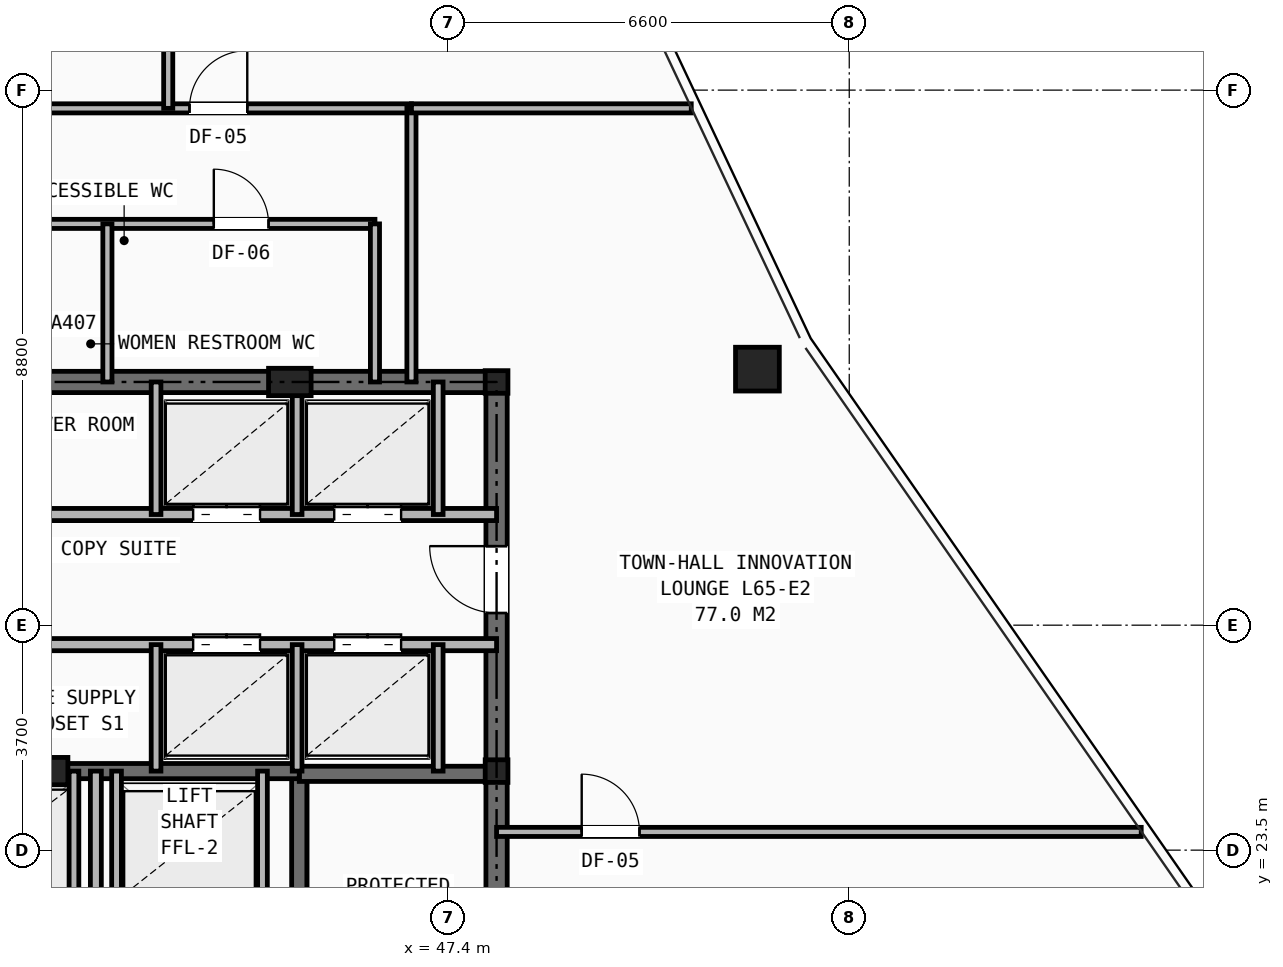
"""IFC4 building model, lengths in metres.
Left out: names, types, materials, properties, quantities, classifications, styles, units other than length and angle.
Written with IfcOpenShell. Run it as: python <this file> out.ifc"""

import sys

from ifc_helpers import new_model, si_unit, direction, frame, frame_2d, origin, origin_2d, place, context, subcontext, project, spatial, rectangle, hollow_rectangle, i_section, extrude, element, fill, save


model = new_model("IFC4")
c1 = context("Model", 3, precision=1e-05, world=origin(), true_north=direction((0.0, 1.0)))
c2 = subcontext(c1, "Body", "Model", "MODEL_VIEW")
j1 = project(units=[si_unit("LENGTHUNIT", "METRE"), si_unit("PLANEANGLEUNIT", "RADIAN")], contexts=[c1])
p1 = place(None, origin())
s1 = spatial("IfcSite", under=j1, at=p1, CompositionType="ELEMENT")
p2 = place(p1, origin())
s2 = spatial("IfcBuilding", under=s1, at=p2, CompositionType="ELEMENT")
p3 = place(p2, frame((0.0, 0.0, 229.4)))
s3 = spatial("IfcBuildingStorey", under=s2, at=p3, CompositionType="ELEMENT", Elevation=229.4)
for number, where, z_axis, x_axis in (
    (1, (48.2, 24.8, 0.0), (0.0, 0.0, 1.0), (1.0, 0.0, 0.0)),
    (2, (48.2, 31.2, 0.0), (0.0, 0.0, 1.0), (1.0, 0.0, 0.0)),
):
    element("IfcColumn", number, at=place(p3, frame(where, z_axis=z_axis, x_axis=x_axis)), inside=s3, PredefinedType="COLUMN", context=c2, shape_type="SweptSolid", body=[
        extrude(i_section(OverallWidth=0.374, OverallDepth=0.372, WebThickness=0.016, FlangeThickness=0.026, at=origin_2d()), origin(), (0.0, 0.0, 1.0), 3.5),
    ])
for number, where, z_axis, x_axis in (
    (3, (44.8, 31.2, 0.0), (0.0, 0.0, 1.0), (1.0, 0.0, 0.0)),
    (4, (40.8, 24.8, 0.0), (0.0, 0.0, 1.0), (1.0, 0.0, 0.0)),
):
    element("IfcColumn", number, at=place(p3, frame(where, z_axis=z_axis, x_axis=x_axis)), inside=s3, PredefinedType="PILASTER", context=c2, shape_type="SweptSolid", body=[
        extrude(rectangle(XDim=0.7, YDim=0.45, at=origin_2d()), origin(), (0.0, 0.0, 1.0), 3.5),
    ])
p4 = place(p3, frame((52.49, 31.411, 0.0), z_axis=(0.0, 0.0, 1.0), x_axis=(1.0, 0.0, 0.0)))
e5 = element("IfcColumn", 5, at=p4, inside=s3, PredefinedType="COLUMN", context=c2, shape_type="SweptSolid", body=[
    extrude(hollow_rectangle(XDim=0.72, YDim=0.72, WallThickness=0.05, at=origin_2d()), origin(), (0.0, 0.0, 1.0), 3.5),
])
p5 = place(p3, frame((31.8, 31.2, 0.0), z_axis=(0.0, 0.0, 1.0), x_axis=(1.0, 0.0, 0.0)))
e6 = element("IfcWall", 6, at=p5, inside=s3, PredefinedType="SHEAR", context=c2, shape_type="SweptSolid", body=[
    extrude(rectangle(XDim=16.4, YDim=0.35, at=frame_2d((8.2, 0.0))), origin(), (0.0, 0.0, 1.0), 3.25),
])
p6 = place(p3, frame((48.2, 16.4, 0.0), z_axis=(0.0, 0.0, 1.0), x_axis=(0.0, 1.0, 0.0)))
e7 = element("IfcWall", 7, at=p6, inside=s3, PredefinedType="SHEAR", context=c2, shape_type="SweptSolid", body=[
    extrude(rectangle(XDim=14.8, YDim=0.35, at=frame_2d((7.4, 0.0))), origin(), (0.0, 0.0, 1.0), 3.25),
])
p7 = place(p6, frame((11.0, 0.0, 0.0)))
e8 = element("IfcOpeningElement", 8, at=p7, cuts=e7, PredefinedType="OPENING", context=c2, shape_type="SweptSolid", body=[
    extrude(rectangle(XDim=1.1, YDim=2.15, at=frame_2d((0.55, 1.075))), frame((0.0, 0.185, 0.0), z_axis=(0.0, -1.0, 0.0), x_axis=(1.0, 0.0, 0.0)), (0.0, 0.0, 1.0), 0.37),
])
p8 = place(p3, frame((44.955, 16.4, 0.0), z_axis=(0.0, 0.0, 1.0), x_axis=(0.0, 1.0, 0.0)))
e9 = element("IfcWall", 9, at=p8, inside=s3, PredefinedType="SHEAR", context=c2, shape_type="SweptSolid", body=[
    extrude(rectangle(XDim=8.4, YDim=0.25, at=frame_2d((4.2, 0.0))), origin(), (0.0, 0.0, 1.0), 3.25),
])
p9 = place(p8, frame((0.45, 0.0, 0.0)))
e10 = element("IfcOpeningElement", 10, at=p9, cuts=e9, PredefinedType="OPENING", context=c2, shape_type="SweptSolid", body=[
    extrude(rectangle(XDim=0.95, YDim=2.1, at=frame_2d((0.475, 1.05))), frame((0.0, 0.135, 0.0), z_axis=(0.0, -1.0, 0.0), x_axis=(1.0, 0.0, 0.0)), (0.0, 0.0, 1.0), 0.27),
])
p10 = place(p3, frame((44.955, 24.755, 0.0), z_axis=(0.0, 0.0, 1.0), x_axis=(1.0, 0.0, 0.0)))
e11 = element("IfcWall", 11, at=p10, inside=s3, PredefinedType="SHEAR", context=c2, shape_type="SweptSolid", body=[
    extrude(rectangle(XDim=3.245, YDim=0.25, at=frame_2d((1.623, 0.0))), origin(), (0.0, 0.0, 1.0), 3.25),
])
p11 = place(p3, frame((35.045, 24.8, 0.0), z_axis=(0.0, 0.0, 1.0), x_axis=(1.0, 0.0, 0.0)))
e12 = element("IfcWall", 12, at=p11, inside=s3, PredefinedType="SHEAR", context=c2, shape_type="SweptSolid", body=[
    extrude(rectangle(XDim=9.91, YDim=0.25, at=frame_2d((4.955, 0.0))), origin(), (0.0, 0.0, 1.0), 3.25),
])
p12 = place(p3, frame((41.61, 16.4, 0.0), z_axis=(0.0, 0.0, 1.0), x_axis=(0.0, 1.0, 0.0)))
e13 = element("IfcWall", 13, at=p12, inside=s3, PredefinedType="PARTITIONING", context=c2, shape_type="SweptSolid", body=[
    extrude(rectangle(XDim=8.4, YDim=0.18, at=frame_2d((4.2, 0.0))), origin(), (0.0, 0.0, 1.0), 2.978),
])
p13 = place(p12, frame((1.8, 0.0, 0.0)))
e14 = element("IfcOpeningElement", 14, at=p13, cuts=e13, PredefinedType="OPENING", context=c2, shape_type="SweptSolid", body=[
    extrude(rectangle(XDim=0.85, YDim=2.05, at=frame_2d((0.425, 1.025))), frame((0.0, 0.1, 0.0), z_axis=(0.0, -1.0, 0.0), x_axis=(1.0, 0.0, 0.0)), (0.0, 0.0, 1.0), 0.2),
])
for number, where, z_axis, x_axis in (
    (15, (41.95, 22.48, 0.0), (0.0, 0.0, 1.0), (0.0, 1.0, 0.0)),
    (16, (44.35, 22.48, 0.0), (0.0, 0.0, 1.0), (0.0, 1.0, 0.0)),
    (17, (41.25, 22.48, 0.0), (0.0, 0.0, 1.0), (0.0, 1.0, 0.0)),
):
    element("IfcWall", number, at=place(p3, frame(where, z_axis=z_axis, x_axis=x_axis)), inside=s3, PredefinedType="SOLIDWALL", context=c2, shape_type="SweptSolid", body=[
        extrude(rectangle(XDim=2.32, YDim=0.16, at=frame_2d((1.16, 0.0))), origin(), (0.0, 0.0, 1.0), 3.25),
    ])
p14 = place(p3, frame((33.82, 29.02, 0.0), z_axis=(0.0, 0.0, 1.0), x_axis=(1.0, 0.0, 0.0)))
e18 = element("IfcWall", 18, at=p14, inside=s3, PredefinedType="SOLIDWALL", context=c2, shape_type="SweptSolid", body=[
    extrude(rectangle(XDim=14.38, YDim=0.2, at=frame_2d((7.19, 0.0))), origin(), (0.0, 0.0, 1.0), 2.705),
])
p15 = place(p14, frame((3.92, 0.0, 0.0)))
e19 = element("IfcOpeningElement", 19, at=p15, cuts=e18, PredefinedType="OPENING", context=c2, shape_type="SweptSolid", body=[
    extrude(rectangle(XDim=0.9, YDim=2.1, at=frame_2d((0.45, 1.05))), frame((0.0, 0.11, 0.0), z_axis=(0.0, -1.0, 0.0), x_axis=(1.0, 0.0, 0.0)), (0.0, 0.0, 1.0), 0.22),
])
p16 = place(p14, frame((9.39, 0.0, 0.0)))
e20 = element("IfcOpeningElement", 20, at=p16, cuts=e18, PredefinedType="OPENING", context=c2, shape_type="SweptSolid", body=[
    extrude(rectangle(XDim=1.1, YDim=2.15, at=frame_2d((0.55, 1.075))), frame((0.0, 0.11, 0.0), z_axis=(0.0, -1.0, 0.0), x_axis=(1.0, 0.0, 0.0)), (0.0, 0.0, 1.0), 0.22),
])
p17 = place(p14, frame((11.71, 0.0, 0.0)))
e21 = element("IfcOpeningElement", 21, at=p17, cuts=e18, PredefinedType="OPENING", context=c2, shape_type="SweptSolid", body=[
    extrude(rectangle(XDim=1.1, YDim=2.15, at=frame_2d((0.55, 1.075))), frame((0.0, 0.11, 0.0), z_axis=(0.0, -1.0, 0.0), x_axis=(1.0, 0.0, 0.0)), (0.0, 0.0, 1.0), 0.22),
])
p18 = place(p3, frame((33.82, 26.88, 0.0), z_axis=(0.0, 0.0, 1.0), x_axis=(1.0, 0.0, 0.0)))
e22 = element("IfcWall", 22, at=p18, inside=s3, PredefinedType="SOLIDWALL", context=c2, shape_type="SweptSolid", body=[
    extrude(rectangle(XDim=14.38, YDim=0.2, at=frame_2d((7.19, 0.0))), origin(), (0.0, 0.0, 1.0), 2.705),
])
p19 = place(p18, frame((1.78, 0.0, 0.0)))
e23 = element("IfcOpeningElement", 23, at=p19, cuts=e22, PredefinedType="OPENING", context=c2, shape_type="SweptSolid", body=[
    extrude(rectangle(XDim=0.9, YDim=2.1, at=frame_2d((0.45, 1.05))), frame((0.0, 0.11, 0.0), z_axis=(0.0, -1.0, 0.0), x_axis=(1.0, 0.0, 0.0)), (0.0, 0.0, 1.0), 0.22),
])
p20 = place(p18, frame((6.07, 0.0, 0.0)))
e24 = element("IfcOpeningElement", 24, at=p20, cuts=e22, PredefinedType="OPENING", context=c2, shape_type="SweptSolid", body=[
    extrude(rectangle(XDim=0.9, YDim=2.1, at=frame_2d((0.45, 1.05))), frame((0.0, 0.11, 0.0), z_axis=(0.0, -1.0, 0.0), x_axis=(1.0, 0.0, 0.0)), (0.0, 0.0, 1.0), 0.22),
])
p21 = place(p18, frame((9.39, 0.0, 0.0)))
e25 = element("IfcOpeningElement", 25, at=p21, cuts=e22, PredefinedType="OPENING", context=c2, shape_type="SweptSolid", body=[
    extrude(rectangle(XDim=1.1, YDim=2.15, at=frame_2d((0.55, 1.075))), frame((0.0, 0.11, 0.0), z_axis=(0.0, -1.0, 0.0), x_axis=(1.0, 0.0, 0.0)), (0.0, 0.0, 1.0), 0.22),
])
p22 = place(p18, frame((11.71, 0.0, 0.0)))
e26 = element("IfcOpeningElement", 26, at=p22, cuts=e22, PredefinedType="OPENING", context=c2, shape_type="SweptSolid", body=[
    extrude(rectangle(XDim=1.1, YDim=2.15, at=frame_2d((0.55, 1.075))), frame((0.0, 0.11, 0.0), z_axis=(0.0, -1.0, 0.0), x_axis=(1.0, 0.0, 0.0)), (0.0, 0.0, 1.0), 0.22),
])
for number, where, z_axis, x_axis in (
    (27, (42.6, 29.02, 0.0), (0.0, 0.0, 1.0), (0.0, 1.0, 0.0)),
    (28, (44.92, 29.02, 0.0), (0.0, 0.0, 1.0), (0.0, 1.0, 0.0)),
    (29, (47.24, 29.02, 0.0), (0.0, 0.0, 1.0), (0.0, 1.0, 0.0)),
):
    element("IfcWall", number, at=place(p3, frame(where, z_axis=z_axis, x_axis=x_axis)), inside=s3, PredefinedType="SOLIDWALL", context=c2, shape_type="SweptSolid", body=[
        extrude(rectangle(XDim=2.18, YDim=0.16, at=frame_2d((1.09, 0.0))), origin(), (0.0, 0.0, 1.0), 2.978),
    ])
for number, where, z_axis, x_axis in (
    (30, (42.6, 24.8, 0.0), (0.0, 0.0, 1.0), (0.0, 1.0, 0.0)),
    (31, (44.92, 24.8, 0.0), (0.0, 0.0, 1.0), (0.0, 1.0, 0.0)),
    (32, (47.24, 24.8, 0.0), (0.0, 0.0, 1.0), (0.0, 1.0, 0.0)),
):
    element("IfcWall", number, at=place(p3, frame(where, z_axis=z_axis, x_axis=x_axis)), inside=s3, PredefinedType="SOLIDWALL", context=c2, shape_type="SweptSolid", body=[
        extrude(rectangle(XDim=2.08, YDim=0.16, at=frame_2d((1.04, 0.0))), origin(), (0.0, 0.0, 1.0), 3.25),
    ])
p23 = place(p3, frame((33.2, 33.8, 0.0), z_axis=(0.0, 0.0, 1.0), x_axis=(1.0, 0.0, 0.0)))
e33 = element("IfcWall", 33, at=p23, inside=s3, PredefinedType="PARTITIONING", context=c2, shape_type="SweptSolid", body=[
    extrude(rectangle(XDim=13.0, YDim=0.15, at=frame_2d((6.5, 0.0))), origin(), (0.0, 0.0, 1.0), 3.25),
])
p24 = place(p23, frame((1.7, 0.0, 0.0)))
e34 = element("IfcOpeningElement", 34, at=p24, cuts=e33, PredefinedType="OPENING", context=c2, shape_type="SweptSolid", body=[
    extrude(rectangle(XDim=0.9, YDim=2.1, at=frame_2d((0.45, 1.05))), frame((0.0, 0.085, 0.0), z_axis=(0.0, -1.0, 0.0), x_axis=(1.0, 0.0, 0.0)), (0.0, 0.0, 1.0), 0.17),
])
p25 = place(p23, frame((6.0, 0.0, 0.0)))
e35 = element("IfcOpeningElement", 35, at=p25, cuts=e33, PredefinedType="OPENING", context=c2, shape_type="SweptSolid", body=[
    extrude(rectangle(XDim=0.9, YDim=2.1, at=frame_2d((0.45, 1.05))), frame((0.0, 0.085, 0.0), z_axis=(0.0, -1.0, 0.0), x_axis=(1.0, 0.0, 0.0)), (0.0, 0.0, 1.0), 0.17),
])
p26 = place(p23, frame((10.35, 0.0, 0.0)))
e36 = element("IfcOpeningElement", 36, at=p26, cuts=e33, PredefinedType="OPENING", context=c2, shape_type="SweptSolid", body=[
    extrude(rectangle(XDim=0.9, YDim=2.1, at=frame_2d((0.45, 1.05))), frame((0.0, 0.085, 0.0), z_axis=(0.0, -1.0, 0.0), x_axis=(1.0, 0.0, 0.0)), (0.0, 0.0, 1.0), 0.17),
])
for number, where, z_axis, x_axis in (
    (37, (46.2, 31.2, 0.0), (0.0, 0.0, 1.0), (0.0, 1.0, 0.0)),
    (38, (41.8, 31.2, 0.0), (0.0, 0.0, 1.0), (0.0, 1.0, 0.0)),
):
    element("IfcWall", number, at=place(p3, frame(where, z_axis=z_axis, x_axis=x_axis)), inside=s3, PredefinedType="PARTITIONING", context=c2, shape_type="SweptSolid", body=[
        extrude(rectangle(XDim=2.6, YDim=0.15, at=frame_2d((1.3, 0.0))), origin(), (0.0, 0.0, 1.0), 2.978),
    ])
p27 = place(p3, frame((40.75, 35.7, 0.0), z_axis=(0.0, 0.0, 1.0), x_axis=(1.0, 0.0, 0.0)))
e39 = element("IfcWall", 39, at=p27, inside=s3, PredefinedType="PARTITIONING", context=c2, shape_type="SweptSolid", body=[
    extrude(rectangle(XDim=6.05, YDim=0.15, at=frame_2d((3.025, 0.0))), origin(), (0.0, 0.0, 1.0), 3.25),
])
p28 = place(p27, frame((2.4, 0.0, 0.0)))
e40 = element("IfcOpeningElement", 40, at=p28, cuts=e39, PredefinedType="OPENING", context=c2, shape_type="SweptSolid", body=[
    extrude(rectangle(XDim=0.95, YDim=2.1, at=frame_2d((0.475, 1.05))), frame((0.0, 0.085, 0.0), z_axis=(0.0, -1.0, 0.0), x_axis=(1.0, 0.0, 0.0)), (0.0, 0.0, 1.0), 0.17),
])
p29 = place(p3, frame((46.8, 31.2, 0.0), z_axis=(0.0, 0.0, 1.0), x_axis=(0.0, 1.0, 0.0)))
e41 = element("IfcWall", 41, at=p29, inside=s3, PredefinedType="PARTITIONING", context=c2, shape_type="SweptSolid", body=[
    extrude(rectangle(XDim=4.5, YDim=0.15, at=frame_2d((2.25, 0.0))), origin(), (0.0, 0.0, 1.0), 2.978),
])
p30 = place(p3, frame((46.8, 35.7, 0.0), z_axis=(0.0, 0.0, 1.0), x_axis=(1.0, 0.0, 0.0)))
e42 = element("IfcWall", 42, at=p30, inside=s3, PredefinedType="PARTITIONING", context=c2, shape_type="SweptSolid", body=[
    extrude(rectangle(XDim=4.602, YDim=0.15, at=frame_2d((2.301, 0.0))), origin(), (0.0, 0.0, 1.0), 2.628),
])
p31 = place(p3, frame((48.2, 23.8, 0.0), z_axis=(0.0, 0.0, 1.0), x_axis=(1.0, 0.0, 0.0)))
e43 = element("IfcWall", 43, at=p31, inside=s3, PredefinedType="PARTITIONING", context=c2, shape_type="SweptSolid", body=[
    extrude(rectangle(XDim=10.602, YDim=0.15, at=frame_2d((5.301, 0.0))), origin(), (0.0, 0.0, 1.0), 2.628),
])
p32 = place(p31, frame((1.4, 0.0, 0.0)))
e44 = element("IfcOpeningElement", 44, at=p32, cuts=e43, PredefinedType="OPENING", context=c2, shape_type="SweptSolid", body=[
    extrude(rectangle(XDim=0.95, YDim=2.1, at=frame_2d((0.475, 1.05))), frame((0.0, 0.085, 0.0), z_axis=(0.0, -1.0, 0.0), x_axis=(1.0, 0.0, 0.0)), (0.0, 0.0, 1.0), 0.17),
])
p33 = place(p3, frame((42.8, 35.7, 0.0), z_axis=(0.0, 0.0, 1.0), x_axis=(0.0, 1.0, 0.0)))
e45 = element("IfcWall", 45, at=p33, inside=s3, PredefinedType="PARTITIONING", context=c2, shape_type="SweptSolid", body=[
    extrude(rectangle(XDim=17.633, YDim=0.15, at=frame_2d((8.816, 0.0))), origin(), (0.0, 0.0, 1.0), 2.292),
])
p34 = place(p7, origin())
e46 = element("IfcDoor", 46, at=p34, inside=s3, OperationType="SINGLE_SWING_RIGHT", PredefinedType="DOOR", context=c2, shape_type="SweptSolid", body=[
    extrude(rectangle(XDim=1.1, YDim=2.15, at=frame_2d((0.55, 1.075))), frame((0.0, 0.025, 0.0), z_axis=(0.0, -1.0, 0.0), x_axis=(1.0, 0.0, 0.0)), (0.0, 0.0, 1.0), 0.05),
])
fill(e8, e46)
p35 = place(p16, origin())
e47 = element("IfcDoor", 47, at=p35, inside=s3, OperationType="DOUBLE_DOOR_SLIDING", PredefinedType="DOOR", context=c2, shape_type="SweptSolid", body=[
    extrude(rectangle(XDim=1.1, YDim=2.15, at=frame_2d((0.55, 1.075))), frame((0.0, 0.025, 0.0), z_axis=(0.0, -1.0, 0.0), x_axis=(1.0, 0.0, 0.0)), (0.0, 0.0, 1.0), 0.05),
])
fill(e20, e47)
p36 = place(p17, origin())
e48 = element("IfcDoor", 48, at=p36, inside=s3, OperationType="DOUBLE_DOOR_SLIDING", PredefinedType="DOOR", context=c2, shape_type="SweptSolid", body=[
    extrude(rectangle(XDim=1.1, YDim=2.15, at=frame_2d((0.55, 1.075))), frame((0.0, 0.025, 0.0), z_axis=(0.0, -1.0, 0.0), x_axis=(1.0, 0.0, 0.0)), (0.0, 0.0, 1.0), 0.05),
])
fill(e21, e48)
p37 = place(p21, origin())
e49 = element("IfcDoor", 49, at=p37, inside=s3, OperationType="DOUBLE_DOOR_SLIDING", PredefinedType="DOOR", context=c2, shape_type="SweptSolid", body=[
    extrude(rectangle(XDim=1.1, YDim=2.15, at=frame_2d((0.55, 1.075))), frame((0.0, 0.025, 0.0), z_axis=(0.0, -1.0, 0.0), x_axis=(1.0, 0.0, 0.0)), (0.0, 0.0, 1.0), 0.05),
])
fill(e25, e49)
p38 = place(p22, origin())
e50 = element("IfcDoor", 50, at=p38, inside=s3, OperationType="DOUBLE_DOOR_SLIDING", PredefinedType="DOOR", context=c2, shape_type="SweptSolid", body=[
    extrude(rectangle(XDim=1.1, YDim=2.15, at=frame_2d((0.55, 1.075))), frame((0.0, 0.025, 0.0), z_axis=(0.0, -1.0, 0.0), x_axis=(1.0, 0.0, 0.0)), (0.0, 0.0, 1.0), 0.05),
])
fill(e26, e50)
p39 = place(p26, origin())
e51 = element("IfcDoor", 51, at=p39, inside=s3, OperationType="SINGLE_SWING_LEFT", PredefinedType="DOOR", context=c2, shape_type="SweptSolid", body=[
    extrude(rectangle(XDim=0.9, YDim=2.1, at=frame_2d((0.45, 1.05))), frame((0.0, 0.025, 0.0), z_axis=(0.0, -1.0, 0.0), x_axis=(1.0, 0.0, 0.0)), (0.0, 0.0, 1.0), 0.05),
])
fill(e36, e51)
p40 = place(p32, origin())
e52 = element("IfcDoor", 52, at=p40, inside=s3, OperationType="SINGLE_SWING_LEFT", PredefinedType="DOOR", context=c2, shape_type="SweptSolid", body=[
    extrude(rectangle(XDim=0.95, YDim=2.1, at=frame_2d((0.475, 1.05))), frame((0.0, 0.025, 0.0), z_axis=(0.0, -1.0, 0.0), x_axis=(1.0, 0.0, 0.0)), (0.0, 0.0, 1.0), 0.05),
])
fill(e44, e52)
p41 = place(p28, origin())
e53 = element("IfcDoor", 53, at=p41, inside=s3, OperationType="SINGLE_SWING_RIGHT", PredefinedType="DOOR", context=c2, shape_type="SweptSolid", body=[
    extrude(rectangle(XDim=0.95, YDim=2.1, at=frame_2d((0.475, 1.05))), frame((0.0, 0.025, 0.0), z_axis=(0.0, -1.0, 0.0), x_axis=(1.0, 0.0, 0.0)), (0.0, 0.0, 1.0), 0.05),
])
fill(e40, e53)
save(model, sys.argv[1])
